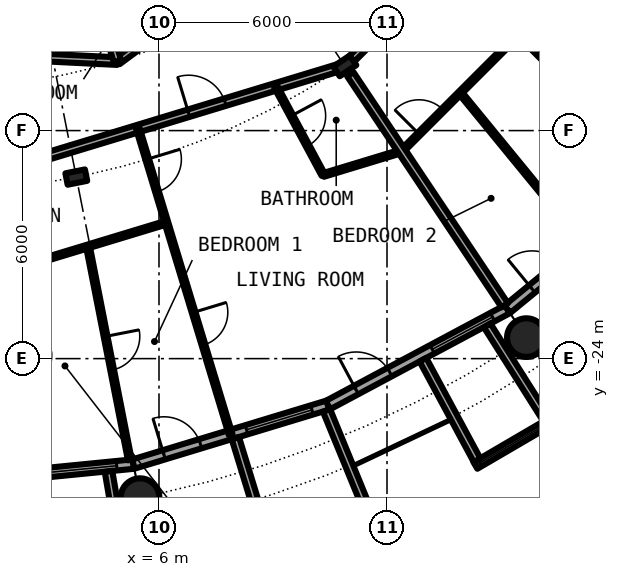
"""IFC4 building model, lengths in metres.
Left out: names, types, materials, properties, quantities, classifications, styles, units other than length and angle.
Written with IfcOpenShell. Run it as: python <this file> out.ifc"""

import sys

from ifc_helpers import new_model, si_unit, direction, frame, frame_2d, origin, origin_2d, place, context, subcontext, project, spatial, rectangle, circle, hollow_circle, i_section, extrude, element, fill, save


model = new_model("IFC4")
c1 = context("Model", 3, precision=1e-05, world=origin(), true_north=direction((0.0, 1.0)))
c2 = subcontext(c1, "Body", "Model", "MODEL_VIEW")
j1 = project(units=[si_unit("LENGTHUNIT", "METRE"), si_unit("PLANEANGLEUNIT", "RADIAN")], contexts=[c1])
p1 = place(None, origin())
s1 = spatial("IfcSite", under=j1, at=p1, CompositionType="ELEMENT")
p2 = place(p1, origin())
s2 = spatial("IfcBuilding", under=s1, at=p2, CompositionType="ELEMENT")
p3 = place(p2, frame((0.0, 0.0, 69.7)))
s3 = spatial("IfcBuildingStorey", under=s2, at=p3, CompositionType="ELEMENT", Elevation=69.7)
for number, where, z_axis, x_axis in (
    (1, (5.501, -27.658, 0.0), (0.0, 0.0, 1.0), (1.0, 0.0, 0.0)),
    (2, (15.667, -23.448, 0.0), (0.0, 0.0, 1.0), (1.0, 0.0, 0.0)),
):
    element("IfcColumn", number, at=place(p3, frame(where, z_axis=z_axis, x_axis=x_axis)), inside=s3, PredefinedType="COLUMN", context=c2, shape_type="SweptSolid", body=[
        extrude(hollow_circle(Radius=0.508, WallThickness=0.04, at=origin_2d()), origin(), (0.0, 0.0, 1.0), 3.05),
    ])
for number, where, z_axis, x_axis in (
    (3, (3.824, -19.223, 0.0), (0.0, 0.0, 1.0), (0.195, -0.981, 0.0)),
    (4, (10.889, -16.297, 0.0), (0.0, 0.0, 1.0), (0.556, -0.831, 0.0)),
):
    element("IfcColumn", number, at=place(p3, frame(where, z_axis=z_axis, x_axis=x_axis)), inside=s3, PredefinedType="COLUMN", context=c2, shape_type="SweptSolid", body=[
        extrude(i_section(OverallWidth=0.306, OverallDepth=0.524, WebThickness=0.021, FlangeThickness=0.04, FilletRadius=0.027, at=origin_2d()), origin(), (0.0, 0.0, 1.0), 3.05),
    ])
p4 = place(p3, frame((0.0, -27.3, 0.0), z_axis=(0.0, 0.0, 1.0), x_axis=(0.995173996315, 0.098126026407, 0.0)))
e5 = element("IfcWall", 5, at=p4, inside=s3, PredefinedType="SOLIDWALL", context=c2, shape_type="SweptSolid", body=[
    extrude(rectangle(XDim=5.352, YDim=0.25, at=frame_2d((2.676, 0.0))), origin(), (0.0, 0.0, 1.0), 2.7),
])
p5 = place(p4, frame((0.841, 0.0, 0.0)))
e6 = element("IfcOpeningElement", 6, at=p5, cuts=e5, PredefinedType="OPENING", context=c2, shape_type="SweptSolid", body=[
    extrude(rectangle(XDim=1.0, YDim=2.2, at=frame_2d((0.5, 1.1))), frame((0.0, 0.135, 0.0), z_axis=(0.0, -1.0, 0.0), x_axis=(1.0, 0.0, 0.0)), (0.0, 0.0, 1.0), 0.27),
])
p6 = place(p4, frame((3.111, 0.0, 0.3)))
e7 = element("IfcOpeningElement", 7, at=p6, cuts=e5, PredefinedType="OPENING", context=c2, shape_type="SweptSolid", body=[
    extrude(rectangle(XDim=1.8, YDim=2.1, at=frame_2d((0.9, 1.05))), frame((0.0, 0.135, 0.0), z_axis=(0.0, -1.0, 0.0), x_axis=(1.0, 0.0, 0.0)), (0.0, 0.0, 1.0), 0.27),
])
p7 = place(p3, frame((4.671, -26.966, -0.03), z_axis=(0.0, 0.0, 1.0), x_axis=(0.170539878907, -0.985350774954, 0.0)))
e8 = element("IfcWall", 8, at=p7, inside=s3, PredefinedType="SOLIDWALL", context=c2, shape_type="SweptSolid", body=[
    extrude(rectangle(XDim=2.932, YDim=0.2, at=frame_2d((1.466, 0.0))), origin(), (0.0, 0.0, 1.0), 2.73),
])
p8 = place(p3, frame((5.326, -26.775, 0.0), z_axis=(0.0, 0.0, 1.0), x_axis=(0.956965678721, 0.290201119486, 0.0)))
e9 = element("IfcWall", 9, at=p8, inside=s3, PredefinedType="SOLIDWALL", context=c2, shape_type="SweptSolid", body=[
    extrude(rectangle(XDim=5.351, YDim=0.25, at=frame_2d((2.676, 0.0))), origin(), (0.0, 0.0, 1.0), 2.7),
])
p9 = place(p8, frame((0.841, 0.0, 0.0)))
e10 = element("IfcOpeningElement", 10, at=p9, cuts=e9, PredefinedType="OPENING", context=c2, shape_type="SweptSolid", body=[
    extrude(rectangle(XDim=1.0, YDim=2.2, at=frame_2d((0.5, 1.1))), frame((0.0, 0.135, 0.0), z_axis=(0.0, -1.0, 0.0), x_axis=(1.0, 0.0, 0.0)), (0.0, 0.0, 1.0), 0.27),
])
p10 = place(p8, frame((3.111, 0.0, 0.3)))
e11 = element("IfcOpeningElement", 11, at=p10, cuts=e9, PredefinedType="OPENING", context=c2, shape_type="SweptSolid", body=[
    extrude(rectangle(XDim=1.8, YDim=2.1, at=frame_2d((0.9, 1.05))), frame((0.0, 0.135, 0.0), z_axis=(0.0, -1.0, 0.0), x_axis=(1.0, 0.0, 0.0)), (0.0, 0.0, 1.0), 0.27),
])
p11 = place(p3, frame((8.009, -26.092, -0.03), z_axis=(0.0, 0.0, 1.0), x_axis=(0.293406695073, -0.955987715029, 0.0)))
e12 = element("IfcWall", 12, at=p11, inside=s3, PredefinedType="SOLIDWALL", context=c2, shape_type="SweptSolid", body=[
    extrude(rectangle(XDim=3.006, YDim=0.2, at=frame_2d((1.503, 0.0))), origin(), (0.0, 0.0, 1.0), 2.73),
])
p12 = place(p3, frame((10.409, -25.364, -0.03), z_axis=(0.0, 0.0, 1.0), x_axis=(0.379509886562, -0.925187681501, 0.0)))
e13 = element("IfcWall", 13, at=p12, inside=s3, PredefinedType="SOLIDWALL", context=c2, shape_type="SweptSolid", body=[
    extrude(rectangle(XDim=2.883, YDim=0.2, at=frame_2d((1.441, 0.0))), origin(), (0.0, 0.0, 1.0), 2.73),
])
p13 = place(p3, frame((10.447, -25.222, 0.0), z_axis=(0.0, 0.0, 1.0), x_axis=(0.881915646801, 0.471407246368, 0.0)))
e14 = element("IfcWall", 14, at=p13, inside=s3, PredefinedType="SOLIDWALL", context=c2, shape_type="SweptSolid", body=[
    extrude(rectangle(XDim=5.352, YDim=0.25, at=frame_2d((2.676, 0.0))), origin(), (0.0, 0.0, 1.0), 2.7),
])
p14 = place(p13, frame((0.841, 0.0, 0.0)))
e15 = element("IfcOpeningElement", 15, at=p14, cuts=e14, PredefinedType="OPENING", context=c2, shape_type="SweptSolid", body=[
    extrude(rectangle(XDim=1.0, YDim=2.2, at=frame_2d((0.5, 1.1))), frame((0.0, 0.135, 0.0), z_axis=(0.0, -1.0, 0.0), x_axis=(1.0, 0.0, 0.0)), (0.0, 0.0, 1.0), 0.27),
])
p15 = place(p13, frame((3.111, 0.0, 0.3)))
e16 = element("IfcOpeningElement", 16, at=p15, cuts=e14, PredefinedType="OPENING", context=c2, shape_type="SweptSolid", body=[
    extrude(rectangle(XDim=1.8, YDim=2.1, at=frame_2d((0.9, 1.05))), frame((0.0, 0.135, 0.0), z_axis=(0.0, -1.0, 0.0), x_axis=(1.0, 0.0, 0.0)), (0.0, 0.0, 1.0), 0.27),
])
p16 = place(p3, frame((14.327, -26.812, -0.03), z_axis=(0.0, 0.0, 1.0), x_axis=(0.863346521872, 0.504611517081, 0.0)))
e17 = element("IfcWall", 17, at=p16, inside=s3, PredefinedType="SOLIDWALL", context=c2, shape_type="SweptSolid", body=[
    extrude(rectangle(XDim=2.336, YDim=0.2, at=frame_2d((1.168, 0.0))), origin(), (0.0, 0.0, 1.0), 2.73),
])
p17 = place(p16, frame((0.128, 0.0, 0.33)))
e18 = element("IfcOpeningElement", 18, at=p17, cuts=e17, PredefinedType="OPENING", context=c2, shape_type="SweptSolid", body=[
    extrude(circle(Radius=1.04, at=frame_2d((1.04, 1.04))), frame((0.0, 0.11, 0.0), z_axis=(0.0, -1.0, 0.0), x_axis=(1.0, 0.0, 0.0)), (0.0, 0.0, 1.0), 0.22),
])
p18 = place(p3, frame((12.945, -24.029, -0.03), z_axis=(0.0, 0.0, 1.0), x_axis=(0.474424310775, -0.88029629861, 0.0)))
e19 = element("IfcWall", 19, at=p18, inside=s3, PredefinedType="SOLIDWALL", context=c2, shape_type="SweptSolid", body=[
    extrude(rectangle(XDim=3.006, YDim=0.2, at=frame_2d((1.503, 0.0))), origin(), (0.0, 0.0, 1.0), 2.73),
])
p19 = place(p3, frame((14.635, -23.126, -0.03), z_axis=(0.0, 0.0, 1.0), x_axis=(0.534437802731, -0.845207805816, 0.0)))
e20 = element("IfcWall", 20, at=p19, inside=s3, PredefinedType="SOLIDWALL", context=c2, shape_type="SweptSolid", body=[
    extrude(rectangle(XDim=2.932, YDim=0.2, at=frame_2d((1.466, 0.0))), origin(), (0.0, 0.0, 1.0), 2.73),
])
p20 = place(p3, frame((15.167, -22.699, 0.0), z_axis=(0.0, 0.0, 1.0), x_axis=(0.773019449054, 0.634382322723, 0.0)))
e21 = element("IfcWall", 21, at=p20, inside=s3, PredefinedType="SOLIDWALL", context=c2, shape_type="SweptSolid", body=[
    extrude(rectangle(XDim=5.352, YDim=0.25, at=frame_2d((2.676, 0.0))), origin(), (0.0, 0.0, 1.0), 2.7),
])
p21 = place(p20, frame((0.841, 0.0, 0.0)))
e22 = element("IfcOpeningElement", 22, at=p21, cuts=e21, PredefinedType="OPENING", context=c2, shape_type="SweptSolid", body=[
    extrude(rectangle(XDim=1.0, YDim=2.2, at=frame_2d((0.5, 1.1))), frame((0.0, 0.135, 0.0), z_axis=(0.0, -1.0, 0.0), x_axis=(1.0, 0.0, 0.0)), (0.0, 0.0, 1.0), 0.27),
])
p22 = place(p20, frame((3.111, 0.0, 0.3)))
e23 = element("IfcOpeningElement", 23, at=p22, cuts=e21, PredefinedType="OPENING", context=c2, shape_type="SweptSolid", body=[
    extrude(rectangle(XDim=1.8, YDim=2.1, at=frame_2d((0.9, 1.05))), frame((0.0, 0.135, 0.0), z_axis=(0.0, -1.0, 0.0), x_axis=(1.0, 0.0, 0.0)), (0.0, 0.0, 1.0), 0.27),
])
p23 = place(p3, frame((12.386, -18.545, 0.0), z_axis=(0.0, 0.0, 1.0), x_axis=(0.707106781187, 0.707106781187, 0.0)))
e24 = element("IfcWall", 24, at=p23, inside=s3, PredefinedType="PARTITIONING", context=c2, shape_type="SweptSolid", body=[
    extrude(rectangle(XDim=4.351, YDim=0.1, at=frame_2d((2.176, 0.0))), origin(), (0.0, 0.0, 1.0), 2.7),
])
p24 = place(p23, frame((0.644, 0.0, 0.0)))
e25 = element("IfcOpeningElement", 25, at=p24, cuts=e24, PredefinedType="OPENING", context=c2, shape_type="SweptSolid", body=[
    extrude(rectangle(XDim=0.9, YDim=2.3, at=frame_2d((0.45, 1.15))), frame((0.0, 0.06, 0.0), z_axis=(0.0, -1.0, 0.0), x_axis=(1.0, 0.0, 0.0)), (0.0, 0.0, 1.0), 0.12),
])
p25 = place(p3, frame((0.0, -22.3, 0.0), z_axis=(0.0, 0.0, 1.0), x_axis=(0.956940987612, 0.290282528286, 0.0)))
e26 = element("IfcWall", 26, at=p25, inside=s3, PredefinedType="PARTITIONING", context=c2, shape_type="SweptSolid", body=[
    extrude(rectangle(XDim=6.477, YDim=0.1, at=frame_2d((3.238, 0.0))), origin(), (0.0, 0.0, 1.0), 2.7),
])
p26 = place(p3, frame((10.327, -19.168, 0.0), z_axis=(0.0, 0.0, 1.0), x_axis=(0.956877769253, 0.290490851335, 0.0)))
e27 = element("IfcWall", 27, at=p26, inside=s3, PredefinedType="PARTITIONING", context=c2, shape_type="SweptSolid", body=[
    extrude(rectangle(XDim=2.158, YDim=0.1, at=frame_2d((1.079, 0.0))), origin(), (0.0, 0.0, 1.0), 2.7),
])
p27 = place(p3, frame((11.0, -16.186, 0.0), z_axis=(0.0, 0.0, 1.0), x_axis=(0.707106781187, 0.707106781187, 0.0)))
e28 = element("IfcWall", 28, at=p27, inside=s3, PredefinedType="PARTITIONING", context=c2, shape_type="SweptSolid", body=[
    extrude(rectangle(XDim=7.334, YDim=0.2, at=frame_2d((3.667, 0.0))), origin(), (0.0, 0.0, 1.0), 2.38),
])
p28 = place(p27, frame((2.211, 0.0, 0.0)))
e29 = element("IfcOpeningElement", 29, at=p28, cuts=e28, PredefinedType="OPENING", context=c2, shape_type="SweptSolid", body=[
    extrude(rectangle(XDim=1.0, YDim=2.3, at=frame_2d((0.5, 1.15))), frame((0.0, 0.11, 0.0), z_axis=(0.0, -1.0, 0.0), x_axis=(1.0, 0.0, 0.0)), (0.0, 0.0, 1.0), 0.22),
])
p29 = place(p3, frame((0.0, -19.6, 0.0), z_axis=(0.0, 0.0, 1.0), x_axis=(0.956932298225, 0.290311172044, 0.0)))
e30 = element("IfcWall", 30, at=p29, inside=s3, PredefinedType="PARTITIONING", context=c2, shape_type="SweptSolid", body=[
    extrude(rectangle(XDim=11.219, YDim=0.2, at=frame_2d((5.61, 0.0))), origin(), (0.0, 0.0, 1.0), 2.38),
])
p30 = place(p29, frame((7.086, 0.0, 0.0)))
e31 = element("IfcOpeningElement", 31, at=p30, cuts=e30, PredefinedType="OPENING", context=c2, shape_type="SweptSolid", body=[
    extrude(rectangle(XDim=1.0, YDim=2.3, at=frame_2d((0.5, 1.15))), frame((0.0, 0.11, 0.0), z_axis=(0.0, -1.0, 0.0), x_axis=(1.0, 0.0, 0.0)), (0.0, 0.0, 1.0), 0.22),
])
p31 = place(p3, frame((-6.469, -15.614, 0.0), z_axis=(0.0, 0.0, 1.0), x_axis=(0.998798520108, -0.049005267363, 0.0)))
e32 = element("IfcWall", 32, at=p31, inside=s3, PredefinedType="PARTITIONING", context=c2, shape_type="SweptSolid", body=[
    extrude(rectangle(XDim=11.389, YDim=0.2, at=frame_2d((5.694, 0.0))), origin(), (0.0, 0.0, 1.0), 2.7),
])
p32 = place(p31, frame((4.383, 0.0, 0.0)))
e33 = element("IfcOpeningElement", 33, at=p32, cuts=e32, PredefinedType="OPENING", context=c2, shape_type="SweptSolid", body=[
    extrude(rectangle(XDim=1.0, YDim=2.3, at=frame_2d((0.5, 1.15))), frame((0.0, 0.11, 0.0), z_axis=(0.0, -1.0, 0.0), x_axis=(1.0, 0.0, 0.0)), (0.0, 0.0, 1.0), 0.22),
])
p33 = place(p3, frame((4.906, -16.172, 0.0), z_axis=(0.0, 0.0, 1.0), x_axis=(0.803204584823, 0.59570327758, 0.0)))
e34 = element("IfcWall", 34, at=p33, inside=s3, PredefinedType="PARTITIONING", context=c2, shape_type="SweptSolid", body=[
    extrude(rectangle(XDim=11.387, YDim=0.2, at=frame_2d((5.693, 0.0))), origin(), (0.0, 0.0, 1.0), 2.7),
])
p34 = place(p33, frame((4.38, 0.0, 0.0)))
e35 = element("IfcOpeningElement", 35, at=p34, cuts=e34, PredefinedType="OPENING", context=c2, shape_type="SweptSolid", body=[
    extrude(rectangle(XDim=1.0, YDim=2.3, at=frame_2d((0.5, 1.15))), frame((0.0, 0.11, 0.0), z_axis=(0.0, -1.0, 0.0), x_axis=(1.0, 0.0, 0.0)), (0.0, 0.0, 1.0), 0.22),
])
p35 = place(p3, frame((2.242, -7.388, 0.0), z_axis=(0.0, 0.0, 1.0), x_axis=(0.290225889812, -0.956958166736, 0.0)))
e36 = element("IfcWall", 36, at=p35, inside=s3, PredefinedType="PARTITIONING", context=c2, shape_type="SweptSolid", body=[
    extrude(rectangle(XDim=9.179, YDim=0.2, at=frame_2d((4.59, 0.0))), origin(), (0.0, 0.0, 1.0), 2.7),
])
p36 = place(p3, frame((4.13, -21.047, 0.0), z_axis=(0.0, 0.0, 1.0), x_axis=(0.192433779325, -0.981309961518, 0.0)))
e37 = element("IfcWall", 37, at=p36, inside=s3, PredefinedType="PARTITIONING", context=c2, shape_type="SweptSolid", body=[
    extrude(rectangle(XDim=5.727, YDim=0.1, at=frame_2d((2.863, 0.0))), origin(), (0.0, 0.0, 1.0), 2.7),
])
p37 = place(p36, frame((2.414, 0.0, 0.0)))
e38 = element("IfcOpeningElement", 38, at=p37, cuts=e37, PredefinedType="OPENING", context=c2, shape_type="SweptSolid", body=[
    extrude(rectangle(XDim=0.9, YDim=2.3, at=frame_2d((0.45, 1.15))), frame((0.0, 0.06, 0.0), z_axis=(0.0, -1.0, 0.0), x_axis=(1.0, 0.0, 0.0)), (0.0, 0.0, 1.0), 0.12),
])
p38 = place(p3, frame((5.445, -17.948, 0.0), z_axis=(0.0, 0.0, 1.0), x_axis=(0.290158700753, -0.956978541231, 0.0)))
e39 = element("IfcWall", 39, at=p38, inside=s3, PredefinedType="PARTITIONING", context=c2, shape_type="SweptSolid", body=[
    extrude(rectangle(XDim=8.419, YDim=0.1, at=frame_2d((4.209, 0.0))), origin(), (0.0, 0.0, 1.0), 2.7),
])
p39 = place(p38, frame((0.842, 0.0, 0.0)))
e40 = element("IfcOpeningElement", 40, at=p39, cuts=e39, PredefinedType="OPENING", context=c2, shape_type="SweptSolid", body=[
    extrude(rectangle(XDim=0.9, YDim=2.3, at=frame_2d((0.45, 1.15))), frame((0.0, 0.06, 0.0), z_axis=(0.0, -1.0, 0.0), x_axis=(1.0, 0.0, 0.0)), (0.0, 0.0, 1.0), 0.12),
])
p40 = place(p38, frame((5.052, 0.0, 0.0)))
e41 = element("IfcOpeningElement", 41, at=p40, cuts=e39, PredefinedType="OPENING", context=c2, shape_type="SweptSolid", body=[
    extrude(rectangle(XDim=0.9, YDim=2.3, at=frame_2d((0.45, 1.15))), frame((0.0, 0.06, 0.0), z_axis=(0.0, -1.0, 0.0), x_axis=(1.0, 0.0, 0.0)), (0.0, 0.0, 1.0), 0.12),
])
p41 = place(p3, frame((9.074, -16.847, 0.0), z_axis=(0.0, 0.0, 1.0), x_axis=(0.474160570331, -0.880438387136, 0.0)))
e42 = element("IfcWall", 42, at=p41, inside=s3, PredefinedType="PARTITIONING", context=c2, shape_type="SweptSolid", body=[
    extrude(rectangle(XDim=2.636, YDim=0.1, at=frame_2d((1.318, 0.0))), origin(), (0.0, 0.0, 1.0), 2.7),
])
p42 = place(p41, frame((0.868, 0.0, 0.0)))
e43 = element("IfcOpeningElement", 43, at=p42, cuts=e42, PredefinedType="OPENING", context=c2, shape_type="SweptSolid", body=[
    extrude(rectangle(XDim=0.9, YDim=2.3, at=frame_2d((0.45, 1.15))), frame((0.0, 0.06, 0.0), z_axis=(0.0, -1.0, 0.0), x_axis=(1.0, 0.0, 0.0)), (0.0, 0.0, 1.0), 0.12),
])
p43 = place(p3, frame((11.034, -16.515, 0.0), z_axis=(0.0, 0.0, 1.0), x_axis=(0.555701298605, -0.831382022135, 0.0)))
e44 = element("IfcWall", 44, at=p43, inside=s3, PredefinedType="PARTITIONING", context=c2, shape_type="SweptSolid", body=[
    extrude(rectangle(XDim=7.313, YDim=0.2, at=frame_2d((3.657, 0.0))), origin(), (0.0, 0.0, 1.0), 2.7),
])
p44 = place(p3, frame((13.927, -17.004, 0.0), z_axis=(0.0, 0.0, 1.0), x_axis=(0.633774976367, -0.773517471898, 0.0)))
e45 = element("IfcWall", 45, at=p44, inside=s3, PredefinedType="PARTITIONING", context=c2, shape_type="SweptSolid", body=[
    extrude(rectangle(XDim=5.196, YDim=0.1, at=frame_2d((2.598, 0.0))), origin(), (0.0, 0.0, 1.0), 2.7),
])
p45 = place(p3, frame((15.465, -15.465, 0.0), z_axis=(0.0, 0.0, 1.0), x_axis=(0.707106781187, -0.707106781187, 0.0)))
e46 = element("IfcWall", 46, at=p45, inside=s3, PredefinedType="PARTITIONING", context=c2, shape_type="SweptSolid", body=[
    extrude(rectangle(XDim=5.305, YDim=0.1, at=frame_2d((2.652, 0.0))), origin(), (0.0, 0.0, 1.0), 2.7),
])
p46 = place(p45, frame((2.202, 0.0, 0.0)))
e47 = element("IfcOpeningElement", 47, at=p46, cuts=e46, PredefinedType="OPENING", context=c2, shape_type="SweptSolid", body=[
    extrude(rectangle(XDim=0.9, YDim=2.3, at=frame_2d((0.45, 1.15))), frame((0.0, 0.06, 0.0), z_axis=(0.0, -1.0, 0.0), x_axis=(1.0, 0.0, 0.0)), (0.0, 0.0, 1.0), 0.12),
])
p47 = place(p6, origin())
e48 = element("IfcWindow", 48, at=p47, inside=s3, PartitioningType="SINGLE_PANEL", PredefinedType="WINDOW", context=c2, shape_type="SweptSolid", body=[
    extrude(rectangle(XDim=1.8, YDim=2.1, at=frame_2d((0.9, 1.05))), frame((0.0, 0.03, 0.0), z_axis=(0.0, -1.0, 0.0), x_axis=(1.0, 0.0, 0.0)), (0.0, 0.0, 1.0), 0.06),
])
fill(e7, e48)
p48 = place(p9, origin())
e49 = element("IfcDoor", 49, at=p48, inside=s3, OperationType="SINGLE_SWING_LEFT", PredefinedType="DOOR", context=c2, shape_type="SweptSolid", body=[
    extrude(rectangle(XDim=1.0, YDim=2.2, at=frame_2d((0.5, 1.1))), frame((0.0, 0.025, 0.0), z_axis=(0.0, -1.0, 0.0), x_axis=(1.0, 0.0, 0.0)), (0.0, 0.0, 1.0), 0.05),
])
fill(e10, e49)
p49 = place(p10, origin())
e50 = element("IfcWindow", 50, at=p49, inside=s3, PartitioningType="SINGLE_PANEL", PredefinedType="WINDOW", context=c2, shape_type="SweptSolid", body=[
    extrude(rectangle(XDim=1.8, YDim=2.1, at=frame_2d((0.9, 1.05))), frame((0.0, 0.03, 0.0), z_axis=(0.0, -1.0, 0.0), x_axis=(1.0, 0.0, 0.0)), (0.0, 0.0, 1.0), 0.06),
])
fill(e11, e50)
p50 = place(p14, origin())
e51 = element("IfcDoor", 51, at=p50, inside=s3, OperationType="SINGLE_SWING_LEFT", PredefinedType="DOOR", context=c2, shape_type="SweptSolid", body=[
    extrude(rectangle(XDim=1.0, YDim=2.2, at=frame_2d((0.5, 1.1))), frame((0.0, 0.025, 0.0), z_axis=(0.0, -1.0, 0.0), x_axis=(1.0, 0.0, 0.0)), (0.0, 0.0, 1.0), 0.05),
])
fill(e15, e51)
p51 = place(p15, origin())
e52 = element("IfcWindow", 52, at=p51, inside=s3, PartitioningType="SINGLE_PANEL", PredefinedType="WINDOW", context=c2, shape_type="SweptSolid", body=[
    extrude(rectangle(XDim=1.8, YDim=2.1, at=frame_2d((0.9, 1.05))), frame((0.0, 0.03, 0.0), z_axis=(0.0, -1.0, 0.0), x_axis=(1.0, 0.0, 0.0)), (0.0, 0.0, 1.0), 0.06),
])
fill(e16, e52)
p52 = place(p17, origin())
e53 = element("IfcWindow", 53, at=p52, inside=s3, PartitioningType="SINGLE_PANEL", PredefinedType="WINDOW", context=c2, shape_type="SweptSolid", body=[
    extrude(circle(Radius=1.04, at=frame_2d((1.04, 1.04))), frame((0.0, 0.03, 0.0), z_axis=(0.0, -1.0, 0.0), x_axis=(1.0, 0.0, 0.0)), (0.0, 0.0, 1.0), 0.06),
])
fill(e18, e53)
p53 = place(p21, origin())
e54 = element("IfcDoor", 54, at=p53, inside=s3, OperationType="SINGLE_SWING_LEFT", PredefinedType="DOOR", context=c2, shape_type="SweptSolid", body=[
    extrude(rectangle(XDim=1.0, YDim=2.2, at=frame_2d((0.5, 1.1))), frame((0.0, 0.025, 0.0), z_axis=(0.0, -1.0, 0.0), x_axis=(1.0, 0.0, 0.0)), (0.0, 0.0, 1.0), 0.05),
])
fill(e22, e54)
p54 = place(p30, origin())
e55 = element("IfcDoor", 55, at=p54, inside=s3, OperationType="SINGLE_SWING_RIGHT", PredefinedType="DOOR", context=c2, shape_type="SweptSolid", body=[
    extrude(rectangle(XDim=1.0, YDim=2.3, at=frame_2d((0.5, 1.15))), frame((0.0, 0.025, 0.0), z_axis=(0.0, -1.0, 0.0), x_axis=(1.0, 0.0, 0.0)), (0.0, 0.0, 1.0), 0.05),
])
fill(e31, e55)
p55 = place(p42, origin())
e56 = element("IfcDoor", 56, at=p55, inside=s3, OperationType="SINGLE_SWING_RIGHT", PredefinedType="DOOR", context=c2, shape_type="SweptSolid", body=[
    extrude(rectangle(XDim=0.9, YDim=2.3, at=frame_2d((0.45, 1.15))), frame((0.0, 0.025, 0.0), z_axis=(0.0, -1.0, 0.0), x_axis=(1.0, 0.0, 0.0)), (0.0, 0.0, 1.0), 0.05),
])
fill(e43, e56)
p56 = place(p39, origin())
e57 = element("IfcDoor", 57, at=p56, inside=s3, OperationType="SINGLE_SWING_LEFT", PredefinedType="DOOR", context=c2, shape_type="SweptSolid", body=[
    extrude(rectangle(XDim=0.9, YDim=2.3, at=frame_2d((0.45, 1.15))), frame((0.0, 0.025, 0.0), z_axis=(0.0, -1.0, 0.0), x_axis=(1.0, 0.0, 0.0)), (0.0, 0.0, 1.0), 0.05),
])
fill(e40, e57)
p57 = place(p40, origin())
e58 = element("IfcDoor", 58, at=p57, inside=s3, OperationType="SINGLE_SWING_RIGHT", PredefinedType="DOOR", context=c2, shape_type="SweptSolid", body=[
    extrude(rectangle(XDim=0.9, YDim=2.3, at=frame_2d((0.45, 1.15))), frame((0.0, 0.025, 0.0), z_axis=(0.0, -1.0, 0.0), x_axis=(1.0, 0.0, 0.0)), (0.0, 0.0, 1.0), 0.05),
])
fill(e41, e58)
p58 = place(p37, origin())
e59 = element("IfcDoor", 59, at=p58, inside=s3, OperationType="SINGLE_SWING_RIGHT", PredefinedType="DOOR", context=c2, shape_type="SweptSolid", body=[
    extrude(rectangle(XDim=0.9, YDim=2.3, at=frame_2d((0.45, 1.15))), frame((0.0, 0.025, 0.0), z_axis=(0.0, -1.0, 0.0), x_axis=(1.0, 0.0, 0.0)), (0.0, 0.0, 1.0), 0.05),
])
fill(e38, e59)
p59 = place(p24, origin())
e60 = element("IfcDoor", 60, at=p59, inside=s3, OperationType="SINGLE_SWING_LEFT", PredefinedType="DOOR", context=c2, shape_type="SweptSolid", body=[
    extrude(rectangle(XDim=0.9, YDim=2.3, at=frame_2d((0.45, 1.15))), frame((0.0, 0.025, 0.0), z_axis=(0.0, -1.0, 0.0), x_axis=(1.0, 0.0, 0.0)), (0.0, 0.0, 1.0), 0.05),
])
fill(e25, e60)
save(model, sys.argv[1])
